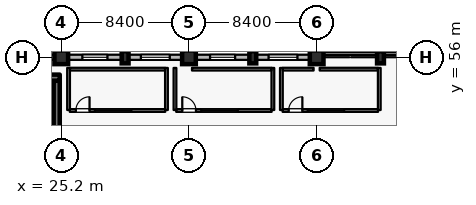
"""IFC4 building model, lengths in metres.
Left out: names, types, materials, properties, quantities, classifications, styles, units other than length and angle.
Written with IfcOpenShell. Run it as: python <this file> out.ifc"""

import sys

from ifc_helpers import new_model, si_unit, direction, frame, frame_2d, origin, origin_2d, place, context, subcontext, project, spatial, rectangle, extrude, element, fill, save


model = new_model("IFC4")
c1 = context("Model", 3, precision=1e-05, world=origin(), true_north=direction((0.0, 1.0)))
c2 = subcontext(c1, "Body", "Model", "MODEL_VIEW")
j1 = project(units=[si_unit("LENGTHUNIT", "METRE"), si_unit("PLANEANGLEUNIT", "RADIAN")], contexts=[c1])
p1 = place(None, origin())
s1 = spatial("IfcSite", under=j1, at=p1, CompositionType="ELEMENT")
p2 = place(p1, origin())
s2 = spatial("IfcBuilding", under=s1, at=p2, CompositionType="ELEMENT")
p3 = place(p2, frame((0.0, 0.0, 11.4)))
s3 = spatial("IfcBuildingStorey", under=s2, at=p3, CompositionType="ELEMENT", Elevation=11.4)
p4 = place(p3, frame((25.2, 56.0, 0.0), z_axis=(0.0, 0.0, 1.0), x_axis=(1.0, 0.0, 0.0)))
e1 = element("IfcColumn", 1, at=p4, inside=s3, PredefinedType="COLUMN", context=c2, shape_type="SweptSolid", body=[
    extrude(rectangle(XDim=0.9, YDim=0.9, at=origin_2d()), origin(), (0.0, 0.0, 1.0), 4.8),
])
p5 = place(p3, frame((29.4, 56.0, 0.0), z_axis=(0.0, 0.0, 1.0), x_axis=(1.0, 0.0, 0.0)))
e2 = element("IfcColumn", 2, at=p5, inside=s3, PredefinedType="PILASTER", context=c2, shape_type="SweptSolid", body=[
    extrude(rectangle(XDim=0.45, YDim=0.8, at=origin_2d()), origin(), (0.0, 0.0, 1.0), 4.8),
])
p6 = place(p3, frame((33.6, 56.0, 0.0), z_axis=(0.0, 0.0, 1.0), x_axis=(1.0, 0.0, 0.0)))
e3 = element("IfcColumn", 3, at=p6, inside=s3, PredefinedType="COLUMN", context=c2, shape_type="SweptSolid", body=[
    extrude(rectangle(XDim=0.9, YDim=0.9, at=origin_2d()), origin(), (0.0, 0.0, 1.0), 4.8),
])
p7 = place(p3, frame((37.8, 56.0, 0.0), z_axis=(0.0, 0.0, 1.0), x_axis=(1.0, 0.0, 0.0)))
e4 = element("IfcColumn", 4, at=p7, inside=s3, PredefinedType="PILASTER", context=c2, shape_type="SweptSolid", body=[
    extrude(rectangle(XDim=0.45, YDim=0.8, at=origin_2d()), origin(), (0.0, 0.0, 1.0), 4.8),
])
p8 = place(p3, frame((42.0, 56.0, 0.0), z_axis=(0.0, 0.0, 1.0), x_axis=(1.0, 0.0, 0.0)))
e5 = element("IfcColumn", 5, at=p8, inside=s3, PredefinedType="COLUMN", context=c2, shape_type="SweptSolid", body=[
    extrude(rectangle(XDim=0.9, YDim=0.9, at=origin_2d()), origin(), (0.0, 0.0, 1.0), 4.8),
])
p9 = place(p3, frame((46.2, 56.0, 0.0), z_axis=(0.0, 0.0, 1.0), x_axis=(1.0, 0.0, 0.0)))
e6 = element("IfcColumn", 6, at=p9, inside=s3, PredefinedType="PILASTER", context=c2, shape_type="SweptSolid", body=[
    extrude(rectangle(XDim=0.45, YDim=0.8, at=origin_2d()), origin(), (0.0, 0.0, 1.0), 4.8),
])
p10 = place(p3, frame((21.225, 56.0, 0.0), z_axis=(0.0, 0.0, 1.0), x_axis=(1.0, 0.0, 0.0)))
e7 = element("IfcWall", 7, at=p10, inside=s3, PredefinedType="SOLIDWALL", context=c2, shape_type="SweptSolid", body=[
    extrude(rectangle(XDim=3.525, YDim=0.34, at=frame_2d((1.762, 0.0))), origin(), (0.0, 0.0, 1.0), 3.6),
])
p11 = place(p10, frame((0.812, 0.0, 1.25)))
e8 = element("IfcOpeningElement", 8, at=p11, cuts=e7, PredefinedType="OPENING", context=c2, shape_type="SweptSolid", body=[
    extrude(rectangle(XDim=1.9, YDim=1.4, at=frame_2d((0.95, 0.7))), frame((0.0, 0.18, 0.0), z_axis=(0.0, -1.0, 0.0), x_axis=(1.0, 0.0, 0.0)), (0.0, 0.0, 1.0), 0.36),
])
p12 = place(p3, frame((25.65, 56.0, 0.0), z_axis=(0.0, 0.0, 1.0), x_axis=(1.0, 0.0, 0.0)))
e9 = element("IfcWall", 9, at=p12, inside=s3, PredefinedType="SOLIDWALL", context=c2, shape_type="SweptSolid", body=[
    extrude(rectangle(XDim=3.525, YDim=0.34, at=frame_2d((1.763, 0.0))), origin(), (0.0, 0.0, 1.0), 3.6),
])
p13 = place(p12, frame((0.938, 0.0, 1.25)))
e10 = element("IfcOpeningElement", 10, at=p13, cuts=e9, PredefinedType="OPENING", context=c2, shape_type="SweptSolid", body=[
    extrude(rectangle(XDim=1.65, YDim=1.35, at=frame_2d((0.825, 0.675))), frame((0.0, 0.18, 0.0), z_axis=(0.0, -1.0, 0.0), x_axis=(1.0, 0.0, 0.0)), (0.0, 0.0, 1.0), 0.36),
])
p14 = place(p3, frame((29.625, 56.0, 0.0), z_axis=(0.0, 0.0, 1.0), x_axis=(1.0, 0.0, 0.0)))
e11 = element("IfcWall", 11, at=p14, inside=s3, PredefinedType="SOLIDWALL", context=c2, shape_type="SweptSolid", body=[
    extrude(rectangle(XDim=3.525, YDim=0.34, at=frame_2d((1.762, 0.0))), origin(), (0.0, 0.0, 1.0), 3.6),
])
p15 = place(p14, frame((0.812, 0.0, 1.25)))
e12 = element("IfcOpeningElement", 12, at=p15, cuts=e11, PredefinedType="OPENING", context=c2, shape_type="SweptSolid", body=[
    extrude(rectangle(XDim=1.9, YDim=1.4, at=frame_2d((0.95, 0.7))), frame((0.0, 0.18, 0.0), z_axis=(0.0, -1.0, 0.0), x_axis=(1.0, 0.0, 0.0)), (0.0, 0.0, 1.0), 0.36),
])
p16 = place(p3, frame((34.05, 56.0, 0.0), z_axis=(0.0, 0.0, 1.0), x_axis=(1.0, 0.0, 0.0)))
e13 = element("IfcWall", 13, at=p16, inside=s3, PredefinedType="SOLIDWALL", context=c2, shape_type="SweptSolid", body=[
    extrude(rectangle(XDim=3.525, YDim=0.34, at=frame_2d((1.762, 0.0))), origin(), (0.0, 0.0, 1.0), 3.6),
])
p17 = place(p16, frame((0.938, 0.0, 1.25)))
e14 = element("IfcOpeningElement", 14, at=p17, cuts=e13, PredefinedType="OPENING", context=c2, shape_type="SweptSolid", body=[
    extrude(rectangle(XDim=1.65, YDim=1.35, at=frame_2d((0.825, 0.675))), frame((0.0, 0.18, 0.0), z_axis=(0.0, -1.0, 0.0), x_axis=(1.0, 0.0, 0.0)), (0.0, 0.0, 1.0), 0.36),
])
p18 = place(p3, frame((38.025, 56.0, 0.0), z_axis=(0.0, 0.0, 1.0), x_axis=(1.0, 0.0, 0.0)))
e15 = element("IfcWall", 15, at=p18, inside=s3, PredefinedType="SOLIDWALL", context=c2, shape_type="SweptSolid", body=[
    extrude(rectangle(XDim=3.525, YDim=0.34, at=frame_2d((1.763, 0.0))), origin(), (0.0, 0.0, 1.0), 3.6),
])
p19 = place(p18, frame((0.812, 0.0, 1.25)))
e16 = element("IfcOpeningElement", 16, at=p19, cuts=e15, PredefinedType="OPENING", context=c2, shape_type="SweptSolid", body=[
    extrude(rectangle(XDim=1.9, YDim=1.4, at=frame_2d((0.95, 0.7))), frame((0.0, 0.18, 0.0), z_axis=(0.0, -1.0, 0.0), x_axis=(1.0, 0.0, 0.0)), (0.0, 0.0, 1.0), 0.36),
])
p20 = place(p3, frame((42.39, 56.25, 0.0), z_axis=(0.0, 0.0, 1.0), x_axis=(1.0, 0.0, 0.0)))
e17 = element("IfcWall", 17, at=p20, inside=s3, PredefinedType="PARAPET", context=c2, shape_type="SweptSolid", body=[
    extrude(rectangle(XDim=7.42, YDim=0.19, at=frame_2d((3.71, 0.0))), origin(), (0.0, 0.0, 1.0), 1.2),
])
p21 = place(p3, frame((24.9, 50.505, 0.0), z_axis=(0.0, 0.0, 1.0), x_axis=(0.0, 1.0, 0.0)))
e18 = element("IfcWall", 18, at=p21, inside=s3, PredefinedType="SHEAR", context=c2, shape_type="SweptSolid", body=[
    extrude(rectangle(XDim=3.95, YDim=0.4, at=frame_2d((1.975, 0.0))), origin(), (0.0, 0.0, 1.0), 4.535),
])
p22 = place(p3, frame((16.9, 54.66, 0.0), z_axis=(0.0, 0.0, 1.0), x_axis=(1.0, 0.0, 0.0)))
e19 = element("IfcWall", 19, at=p22, inside=s3, PredefinedType="SHEAR", context=c2, shape_type="SweptSolid", body=[
    extrude(rectangle(XDim=8.2, YDim=0.4, at=frame_2d((4.1, 0.0))), origin(), (0.0, 0.0, 1.0), 4.535),
])
p23 = place(p3, frame((25.76, 52.5, 0.0), z_axis=(0.0, 0.0, 1.0), x_axis=(1.0, 0.0, 0.0)))
e20 = element("IfcWall", 20, at=p23, inside=s3, PredefinedType="PARTITIONING", context=c2, shape_type="SweptSolid", body=[
    extrude(rectangle(XDim=6.28, YDim=0.18, at=frame_2d((3.14, 0.0))), origin(), (0.0, 0.0, 1.0), 4.535),
])
p24 = place(p23, frame((0.4, 0.0, 0.0)))
e21 = element("IfcOpeningElement", 21, at=p24, cuts=e20, PredefinedType="OPENING", context=c2, shape_type="SweptSolid", body=[
    extrude(rectangle(XDim=0.9, YDim=2.1, at=frame_2d((0.45, 1.05))), frame((0.0, 0.1, 0.0), z_axis=(0.0, -1.0, 0.0), x_axis=(1.0, 0.0, 0.0)), (0.0, 0.0, 1.0), 0.2),
])
p25 = place(p23, frame((1.65, 0.0, 0.9)))
e22 = element("IfcOpeningElement", 22, at=p25, cuts=e20, PredefinedType="OPENING", context=c2, shape_type="SweptSolid", body=[
    extrude(rectangle(XDim=2.4, YDim=1.3, at=frame_2d((1.2, 0.65))), frame((0.0, 0.1, 0.0), z_axis=(0.0, -1.0, 0.0), x_axis=(1.0, 0.0, 0.0)), (0.0, 0.0, 1.0), 0.2),
])
p26 = place(p3, frame((32.76, 52.5, 0.0), z_axis=(0.0, 0.0, 1.0), x_axis=(1.0, 0.0, 0.0)))
e23 = element("IfcWall", 23, at=p26, inside=s3, PredefinedType="PARTITIONING", context=c2, shape_type="SweptSolid", body=[
    extrude(rectangle(XDim=6.28, YDim=0.18, at=frame_2d((3.14, 0.0))), origin(), (0.0, 0.0, 1.0), 4.535),
])
p27 = place(p26, frame((0.4, 0.0, 0.0)))
e24 = element("IfcOpeningElement", 24, at=p27, cuts=e23, PredefinedType="OPENING", context=c2, shape_type="SweptSolid", body=[
    extrude(rectangle(XDim=0.9, YDim=2.1, at=frame_2d((0.45, 1.05))), frame((0.0, 0.1, 0.0), z_axis=(0.0, -1.0, 0.0), x_axis=(1.0, 0.0, 0.0)), (0.0, 0.0, 1.0), 0.2),
])
p28 = place(p26, frame((1.65, 0.0, 0.9)))
e25 = element("IfcOpeningElement", 25, at=p28, cuts=e23, PredefinedType="OPENING", context=c2, shape_type="SweptSolid", body=[
    extrude(rectangle(XDim=2.4, YDim=1.3, at=frame_2d((1.2, 0.65))), frame((0.0, 0.1, 0.0), z_axis=(0.0, -1.0, 0.0), x_axis=(1.0, 0.0, 0.0)), (0.0, 0.0, 1.0), 0.2),
])
p29 = place(p3, frame((39.76, 52.5, 0.0), z_axis=(0.0, 0.0, 1.0), x_axis=(1.0, 0.0, 0.0)))
e26 = element("IfcWall", 26, at=p29, inside=s3, PredefinedType="PARTITIONING", context=c2, shape_type="SweptSolid", body=[
    extrude(rectangle(XDim=6.28, YDim=0.18, at=frame_2d((3.14, 0.0))), origin(), (0.0, 0.0, 1.0), 4.535),
])
p30 = place(p29, frame((0.4, 0.0, 0.0)))
e27 = element("IfcOpeningElement", 27, at=p30, cuts=e26, PredefinedType="OPENING", context=c2, shape_type="SweptSolid", body=[
    extrude(rectangle(XDim=0.9, YDim=2.1, at=frame_2d((0.45, 1.05))), frame((0.0, 0.1, 0.0), z_axis=(0.0, -1.0, 0.0), x_axis=(1.0, 0.0, 0.0)), (0.0, 0.0, 1.0), 0.2),
])
p31 = place(p29, frame((1.65, 0.0, 0.9)))
e28 = element("IfcOpeningElement", 28, at=p31, cuts=e26, PredefinedType="OPENING", context=c2, shape_type="SweptSolid", body=[
    extrude(rectangle(XDim=2.4, YDim=1.3, at=frame_2d((1.2, 0.65))), frame((0.0, 0.1, 0.0), z_axis=(0.0, -1.0, 0.0), x_axis=(1.0, 0.0, 0.0)), (0.0, 0.0, 1.0), 0.2),
])
for number, where, z_axis, x_axis in (
    (29, (25.68, 52.532, 0.0), (0.0, 0.0, 1.0), (0.0, 1.0, 0.0)),
    (30, (32.12, 52.532, 0.0), (0.0, 0.0, 1.0), (0.0, 1.0, 0.0)),
):
    element("IfcWall", number, at=place(p3, frame(where, z_axis=z_axis, x_axis=x_axis)), inside=s3, PredefinedType="PARTITIONING", context=c2, shape_type="SweptSolid", body=[
        extrude(rectangle(XDim=2.768, YDim=0.18, at=frame_2d((1.384, 0.0))), origin(), (0.0, 0.0, 1.0), 4.535),
    ])
p32 = place(p3, frame((25.77, 55.22, 0.0), z_axis=(0.0, 0.0, 1.0), x_axis=(1.0, 0.0, 0.0)))
e31 = element("IfcWall", 31, at=p32, inside=s3, PredefinedType="PARTITIONING", context=c2, shape_type="SweptSolid", body=[
    extrude(rectangle(XDim=6.26, YDim=0.18, at=frame_2d((3.13, 0.0))), origin(), (0.0, 0.0, 1.0), 4.535),
])
for number, where, z_axis, x_axis in (
    (32, (32.68, 52.532, 0.0), (0.0, 0.0, 1.0), (0.0, 1.0, 0.0)),
    (33, (39.12, 52.532, 0.0), (0.0, 0.0, 1.0), (0.0, 1.0, 0.0)),
):
    element("IfcWall", number, at=place(p3, frame(where, z_axis=z_axis, x_axis=x_axis)), inside=s3, PredefinedType="PARTITIONING", context=c2, shape_type="SweptSolid", body=[
        extrude(rectangle(XDim=2.768, YDim=0.18, at=frame_2d((1.384, 0.0))), origin(), (0.0, 0.0, 1.0), 4.535),
    ])
p33 = place(p3, frame((33.8, 55.22, 0.0), z_axis=(0.0, 0.0, 1.0), x_axis=(1.0, 0.0, 0.0)))
e34 = element("IfcWall", 34, at=p33, inside=s3, PredefinedType="PARTITIONING", context=c2, shape_type="SweptSolid", body=[
    extrude(rectangle(XDim=5.23, YDim=0.18, at=frame_2d((2.615, 0.0))), origin(), (0.0, 0.0, 1.0), 4.535),
])
for number, where, z_axis, x_axis in (
    (35, (39.68, 52.532, 0.0), (0.0, 0.0, 1.0), (0.0, 1.0, 0.0)),
    (36, (46.12, 52.532, 0.0), (0.0, 0.0, 1.0), (0.0, 1.0, 0.0)),
):
    element("IfcWall", number, at=place(p3, frame(where, z_axis=z_axis, x_axis=x_axis)), inside=s3, PredefinedType="PARTITIONING", context=c2, shape_type="SweptSolid", body=[
        extrude(rectangle(XDim=2.768, YDim=0.18, at=frame_2d((1.384, 0.0))), origin(), (0.0, 0.0, 1.0), 4.535),
    ])
p34 = place(p3, frame((39.77, 55.22, 0.0), z_axis=(0.0, 0.0, 1.0), x_axis=(1.0, 0.0, 0.0)))
e37 = element("IfcWall", 37, at=p34, inside=s3, PredefinedType="PARTITIONING", context=c2, shape_type="SweptSolid", body=[
    extrude(rectangle(XDim=2.03, YDim=0.18, at=frame_2d((1.015, 0.0))), origin(), (0.0, 0.0, 1.0), 4.535),
])
p35 = place(p3, frame((42.2, 55.22, 0.0), z_axis=(0.0, 0.0, 1.0), x_axis=(1.0, 0.0, 0.0)))
e38 = element("IfcWall", 38, at=p35, inside=s3, PredefinedType="PARTITIONING", context=c2, shape_type="SweptSolid", body=[
    extrude(rectangle(XDim=3.83, YDim=0.18, at=frame_2d((1.915, 0.0))), origin(), (0.0, 0.0, 1.0), 4.535),
])
p36 = place(p13, origin())
e39 = element("IfcWindow", 39, at=p36, inside=s3, PartitioningType="SINGLE_PANEL", PredefinedType="WINDOW", context=c2, shape_type="SweptSolid", body=[
    extrude(rectangle(XDim=1.65, YDim=1.35, at=frame_2d((0.825, 0.675))), frame((0.0, 0.03, 0.0), z_axis=(0.0, -1.0, 0.0), x_axis=(1.0, 0.0, 0.0)), (0.0, 0.0, 1.0), 0.06),
])
fill(e10, e39)
p37 = place(p15, origin())
e40 = element("IfcWindow", 40, at=p37, inside=s3, PartitioningType="DOUBLE_PANEL_VERTICAL", PredefinedType="WINDOW", context=c2, shape_type="SweptSolid", body=[
    extrude(rectangle(XDim=1.9, YDim=1.4, at=frame_2d((0.95, 0.7))), frame((0.0, 0.03, 0.0), z_axis=(0.0, -1.0, 0.0), x_axis=(1.0, 0.0, 0.0)), (0.0, 0.0, 1.0), 0.06),
])
fill(e12, e40)
p38 = place(p17, origin())
e41 = element("IfcWindow", 41, at=p38, inside=s3, PartitioningType="SINGLE_PANEL", PredefinedType="WINDOW", context=c2, shape_type="SweptSolid", body=[
    extrude(rectangle(XDim=1.65, YDim=1.35, at=frame_2d((0.825, 0.675))), frame((0.0, 0.03, 0.0), z_axis=(0.0, -1.0, 0.0), x_axis=(1.0, 0.0, 0.0)), (0.0, 0.0, 1.0), 0.06),
])
fill(e14, e41)
p39 = place(p19, origin())
e42 = element("IfcWindow", 42, at=p39, inside=s3, PartitioningType="DOUBLE_PANEL_VERTICAL", PredefinedType="WINDOW", context=c2, shape_type="SweptSolid", body=[
    extrude(rectangle(XDim=1.9, YDim=1.4, at=frame_2d((0.95, 0.7))), frame((0.0, 0.03, 0.0), z_axis=(0.0, -1.0, 0.0), x_axis=(1.0, 0.0, 0.0)), (0.0, 0.0, 1.0), 0.06),
])
fill(e16, e42)
p40 = place(p24, origin())
e43 = element("IfcDoor", 43, at=p40, inside=s3, OperationType="SINGLE_SWING_RIGHT", PredefinedType="DOOR", context=c2, shape_type="SweptSolid", body=[
    extrude(rectangle(XDim=0.9, YDim=2.1, at=frame_2d((0.45, 1.05))), frame((0.0, 0.025, 0.0), z_axis=(0.0, -1.0, 0.0), x_axis=(1.0, 0.0, 0.0)), (0.0, 0.0, 1.0), 0.05),
])
fill(e21, e43)
p41 = place(p25, origin())
e44 = element("IfcWindow", 44, at=p41, inside=s3, PartitioningType="DOUBLE_PANEL_VERTICAL", PredefinedType="WINDOW", context=c2, shape_type="SweptSolid", body=[
    extrude(rectangle(XDim=2.4, YDim=1.3, at=frame_2d((1.2, 0.65))), frame((0.0, 0.03, 0.0), z_axis=(0.0, -1.0, 0.0), x_axis=(1.0, 0.0, 0.0)), (0.0, 0.0, 1.0), 0.06),
])
fill(e22, e44)
p42 = place(p27, origin())
e45 = element("IfcDoor", 45, at=p42, inside=s3, OperationType="SINGLE_SWING_LEFT", PredefinedType="DOOR", context=c2, shape_type="SweptSolid", body=[
    extrude(rectangle(XDim=0.9, YDim=2.1, at=frame_2d((0.45, 1.05))), frame((0.0, 0.025, 0.0), z_axis=(0.0, -1.0, 0.0), x_axis=(1.0, 0.0, 0.0)), (0.0, 0.0, 1.0), 0.05),
])
fill(e24, e45)
p43 = place(p28, origin())
e46 = element("IfcWindow", 46, at=p43, inside=s3, PartitioningType="DOUBLE_PANEL_VERTICAL", PredefinedType="WINDOW", context=c2, shape_type="SweptSolid", body=[
    extrude(rectangle(XDim=2.4, YDim=1.3, at=frame_2d((1.2, 0.65))), frame((0.0, 0.03, 0.0), z_axis=(0.0, -1.0, 0.0), x_axis=(1.0, 0.0, 0.0)), (0.0, 0.0, 1.0), 0.06),
])
fill(e25, e46)
p44 = place(p30, origin())
e47 = element("IfcDoor", 47, at=p44, inside=s3, OperationType="SINGLE_SWING_RIGHT", PredefinedType="DOOR", context=c2, shape_type="SweptSolid", body=[
    extrude(rectangle(XDim=0.9, YDim=2.1, at=frame_2d((0.45, 1.05))), frame((0.0, 0.025, 0.0), z_axis=(0.0, -1.0, 0.0), x_axis=(1.0, 0.0, 0.0)), (0.0, 0.0, 1.0), 0.05),
])
fill(e27, e47)
p45 = place(p31, origin())
e48 = element("IfcWindow", 48, at=p45, inside=s3, PartitioningType="DOUBLE_PANEL_VERTICAL", PredefinedType="WINDOW", context=c2, shape_type="SweptSolid", body=[
    extrude(rectangle(XDim=2.4, YDim=1.3, at=frame_2d((1.2, 0.65))), frame((0.0, 0.03, 0.0), z_axis=(0.0, -1.0, 0.0), x_axis=(1.0, 0.0, 0.0)), (0.0, 0.0, 1.0), 0.06),
])
fill(e28, e48)
save(model, sys.argv[1])
